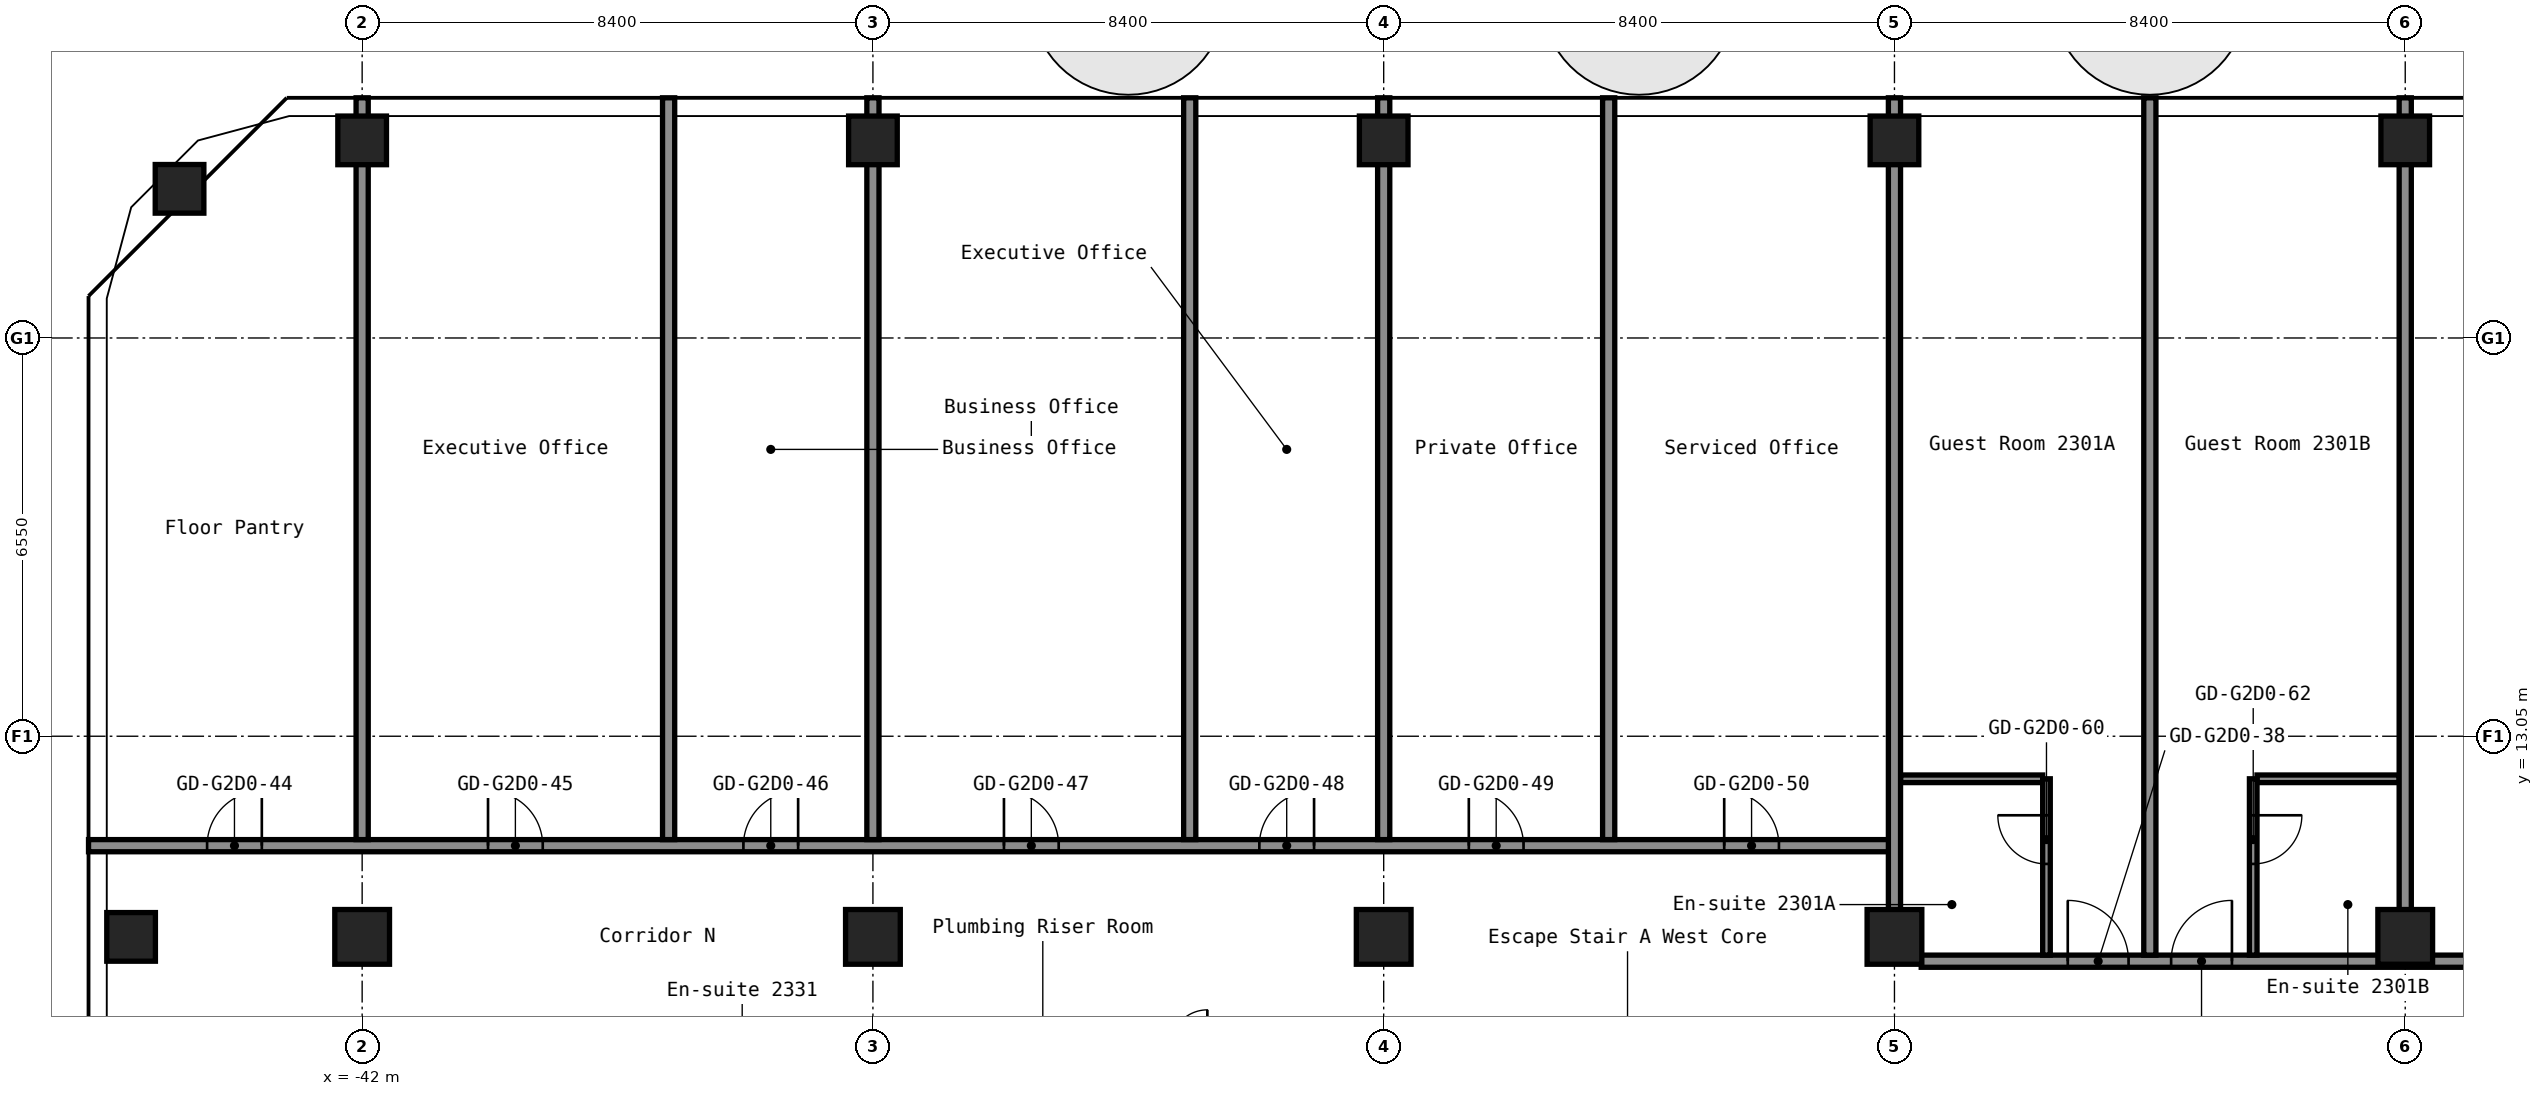
"""IFC4 building model, lengths in metres.
Left out: names, types, materials, properties, quantities, classifications, styles, units other than length and angle.
Written with IfcOpenShell. Run it as: python <this file> out.ifc"""

import sys

from ifc_helpers import new_model, si_unit, direction, frame, frame_2d, origin, origin_2d, place, context, subcontext, project, spatial, rectangle, hollow_rectangle, extrude, element, fill, save


model = new_model("IFC4")
c1 = context("Model", 3, precision=1e-05, world=origin(), true_north=direction((0.0, 1.0)))
c2 = subcontext(c1, "Body", "Model", "MODEL_VIEW")
j1 = project(units=[si_unit("LENGTHUNIT", "METRE"), si_unit("PLANEANGLEUNIT", "RADIAN")], contexts=[c1])
p1 = place(None, origin())
s1 = spatial("IfcSite", under=j1, at=p1, CompositionType="ELEMENT")
p2 = place(p1, origin())
s2 = spatial("IfcBuilding", under=s1, at=p2, CompositionType="ELEMENT")
p3 = place(p2, frame((0.0, 0.0, 85.0)))
s3 = spatial("IfcBuildingStorey", under=s2, at=p3, CompositionType="ELEMENT", Elevation=85.0)
for number, where, z_axis, x_axis in (
    (1, (-45.8, 9.75, 0.0), (0.0, 0.0, 1.0), (1.0, 0.0, 0.0)),
    (2, (-45.003, 22.053, 0.0), (0.0, 0.0, 1.0), (1.0, 0.0, 0.0)),
):
    element("IfcColumn", number, at=place(p3, frame(where, z_axis=z_axis, x_axis=x_axis)), inside=s3, PredefinedType="COLUMN", context=c2, shape_type="SweptSolid", body=[
        extrude(hollow_rectangle(XDim=0.8, YDim=0.8, WallThickness=0.032, at=origin_2d()), origin(), (0.0, 0.0, 1.0), 2.8),
    ])
p4 = place(p3, frame((-42.0, 9.75, 0.0), z_axis=(0.0, 0.0, 1.0), x_axis=(1.0, 0.0, 0.0)))
e3 = element("IfcColumn", 3, at=p4, inside=s3, PredefinedType="COLUMN", context=c2, shape_type="SweptSolid", body=[
    extrude(hollow_rectangle(XDim=0.9, YDim=0.9, WallThickness=0.036, at=origin_2d()), origin(), (0.0, 0.0, 1.0), 2.8),
])
p5 = place(p3, frame((-42.0, 22.85, 0.0), z_axis=(0.0, 0.0, 1.0), x_axis=(1.0, 0.0, 0.0)))
e4 = element("IfcColumn", 4, at=p5, inside=s3, PredefinedType="COLUMN", context=c2, shape_type="SweptSolid", body=[
    extrude(hollow_rectangle(XDim=0.8, YDim=0.8, WallThickness=0.032, at=origin_2d()), origin(), (0.0, 0.0, 1.0), 2.8),
])
p6 = place(p3, frame((-33.6, 9.75, 0.0), z_axis=(0.0, 0.0, 1.0), x_axis=(1.0, 0.0, 0.0)))
e5 = element("IfcColumn", 5, at=p6, inside=s3, PredefinedType="COLUMN", context=c2, shape_type="SweptSolid", body=[
    extrude(hollow_rectangle(XDim=0.9, YDim=0.9, WallThickness=0.036, at=origin_2d()), origin(), (0.0, 0.0, 1.0), 2.8),
])
p7 = place(p3, frame((-33.6, 22.85, 0.0), z_axis=(0.0, 0.0, 1.0), x_axis=(1.0, 0.0, 0.0)))
e6 = element("IfcColumn", 6, at=p7, inside=s3, PredefinedType="COLUMN", context=c2, shape_type="SweptSolid", body=[
    extrude(hollow_rectangle(XDim=0.8, YDim=0.8, WallThickness=0.032, at=origin_2d()), origin(), (0.0, 0.0, 1.0), 2.8),
])
p8 = place(p3, frame((-25.2, 9.75, 0.0), z_axis=(0.0, 0.0, 1.0), x_axis=(1.0, 0.0, 0.0)))
e7 = element("IfcColumn", 7, at=p8, inside=s3, PredefinedType="COLUMN", context=c2, shape_type="SweptSolid", body=[
    extrude(hollow_rectangle(XDim=0.9, YDim=0.9, WallThickness=0.036, at=origin_2d()), origin(), (0.0, 0.0, 1.0), 2.8),
])
p9 = place(p3, frame((-25.2, 22.85, 0.0), z_axis=(0.0, 0.0, 1.0), x_axis=(1.0, 0.0, 0.0)))
e8 = element("IfcColumn", 8, at=p9, inside=s3, PredefinedType="COLUMN", context=c2, shape_type="SweptSolid", body=[
    extrude(hollow_rectangle(XDim=0.8, YDim=0.8, WallThickness=0.032, at=origin_2d()), origin(), (0.0, 0.0, 1.0), 2.8),
])
p10 = place(p3, frame((-16.8, 9.75, 0.0), z_axis=(0.0, 0.0, 1.0), x_axis=(1.0, 0.0, 0.0)))
e9 = element("IfcColumn", 9, at=p10, inside=s3, PredefinedType="COLUMN", context=c2, shape_type="SweptSolid", body=[
    extrude(hollow_rectangle(XDim=0.9, YDim=0.9, WallThickness=0.036, at=origin_2d()), origin(), (0.0, 0.0, 1.0), 2.8),
])
p11 = place(p3, frame((-16.8, 22.85, 0.0), z_axis=(0.0, 0.0, 1.0), x_axis=(1.0, 0.0, 0.0)))
e10 = element("IfcColumn", 10, at=p11, inside=s3, PredefinedType="COLUMN", context=c2, shape_type="SweptSolid", body=[
    extrude(hollow_rectangle(XDim=0.8, YDim=0.8, WallThickness=0.032, at=origin_2d()), origin(), (0.0, 0.0, 1.0), 2.8),
])
p12 = place(p3, frame((-8.4, 9.75, 0.0), z_axis=(0.0, 0.0, 1.0), x_axis=(1.0, 0.0, 0.0)))
e11 = element("IfcColumn", 11, at=p12, inside=s3, PredefinedType="COLUMN", context=c2, shape_type="SweptSolid", body=[
    extrude(hollow_rectangle(XDim=0.9, YDim=0.9, WallThickness=0.036, at=origin_2d()), origin(), (0.0, 0.0, 1.0), 2.8),
])
p13 = place(p3, frame((-8.4, 22.85, 0.0), z_axis=(0.0, 0.0, 1.0), x_axis=(1.0, 0.0, 0.0)))
e12 = element("IfcColumn", 12, at=p13, inside=s3, PredefinedType="COLUMN", context=c2, shape_type="SweptSolid", body=[
    extrude(hollow_rectangle(XDim=0.8, YDim=0.8, WallThickness=0.032, at=origin_2d()), origin(), (0.0, 0.0, 1.0), 2.8),
])
p14 = place(p3, frame((-16.36, 9.35, 0.0), z_axis=(0.0, 0.0, 1.0), x_axis=(1.0, 0.0, 0.0)))
e13 = element("IfcWall", 13, at=p14, inside=s3, PredefinedType="PARTITIONING", context=c2, shape_type="SweptSolid", body=[
    extrude(rectangle(XDim=32.72, YDim=0.2, at=frame_2d((16.36, 0.0))), origin(), (0.0, 0.0, 1.0), 2.8),
])
p15 = place(p14, frame((2.41, 0.0, 0.0)))
e14 = element("IfcOpeningElement", 14, at=p15, cuts=e13, PredefinedType="OPENING", context=c2, shape_type="SweptSolid", body=[
    extrude(rectangle(XDim=1.0, YDim=2.1, at=frame_2d((0.5, 1.05))), frame((0.0, 0.11, 0.0), z_axis=(0.0, -1.0, 0.0), x_axis=(1.0, 0.0, 0.0)), (0.0, 0.0, 1.0), 0.22),
])
p16 = place(p14, frame((4.11, 0.0, 0.0)))
e15 = element("IfcOpeningElement", 15, at=p16, cuts=e13, PredefinedType="OPENING", context=c2, shape_type="SweptSolid", body=[
    extrude(rectangle(XDim=1.0, YDim=2.1, at=frame_2d((0.5, 1.05))), frame((0.0, 0.11, 0.0), z_axis=(0.0, -1.0, 0.0), x_axis=(1.0, 0.0, 0.0)), (0.0, 0.0, 1.0), 0.22),
])
p17 = place(p14, frame((9.96, 0.0, 0.0)))
e16 = element("IfcOpeningElement", 16, at=p17, cuts=e13, PredefinedType="OPENING", context=c2, shape_type="SweptSolid", body=[
    extrude(rectangle(XDim=1.0, YDim=2.1, at=frame_2d((0.5, 1.05))), frame((0.0, 0.11, 0.0), z_axis=(0.0, -1.0, 0.0), x_axis=(1.0, 0.0, 0.0)), (0.0, 0.0, 1.0), 0.22),
])
p18 = place(p14, frame((19.21, 0.0, 0.0)))
e17 = element("IfcOpeningElement", 17, at=p18, cuts=e13, PredefinedType="OPENING", context=c2, shape_type="SweptSolid", body=[
    extrude(rectangle(XDim=1.0, YDim=2.1, at=frame_2d((0.5, 1.05))), frame((0.0, 0.11, 0.0), z_axis=(0.0, -1.0, 0.0), x_axis=(1.0, 0.0, 0.0)), (0.0, 0.0, 1.0), 0.22),
])
p19 = place(p14, frame((20.91, 0.0, 0.0)))
e18 = element("IfcOpeningElement", 18, at=p19, cuts=e13, PredefinedType="OPENING", context=c2, shape_type="SweptSolid", body=[
    extrude(rectangle(XDim=1.0, YDim=2.1, at=frame_2d((0.5, 1.05))), frame((0.0, 0.11, 0.0), z_axis=(0.0, -1.0, 0.0), x_axis=(1.0, 0.0, 0.0)), (0.0, 0.0, 1.0), 0.22),
])
p20 = place(p14, frame((30.16, 0.0, 0.0)))
e19 = element("IfcOpeningElement", 19, at=p20, cuts=e13, PredefinedType="OPENING", context=c2, shape_type="SweptSolid", body=[
    extrude(rectangle(XDim=1.0, YDim=2.1, at=frame_2d((0.5, 1.05))), frame((0.0, 0.11, 0.0), z_axis=(0.0, -1.0, 0.0), x_axis=(1.0, 0.0, 0.0)), (0.0, 0.0, 1.0), 0.22),
])
p21 = place(p3, frame((-46.5, 11.25, 0.0), z_axis=(0.0, 0.0, 1.0), x_axis=(1.0, 0.0, 0.0)))
e20 = element("IfcWall", 20, at=p21, inside=s3, PredefinedType="PARTITIONING", context=c2, shape_type="SweptSolid", body=[
    extrude(rectangle(XDim=29.7, YDim=0.2, at=frame_2d((14.85, 0.0))), origin(), (0.0, 0.0, 1.0), 2.8),
])
p22 = place(p21, frame((1.95, 0.0, 0.0)))
e21 = element("IfcOpeningElement", 21, at=p22, cuts=e20, PredefinedType="OPENING", context=c2, shape_type="SweptSolid", body=[
    extrude(rectangle(XDim=0.9, YDim=2.1, at=frame_2d((0.45, 1.05))), frame((0.0, 0.11, 0.0), z_axis=(0.0, -1.0, 0.0), x_axis=(1.0, 0.0, 0.0)), (0.0, 0.0, 1.0), 0.22),
])
p23 = place(p21, frame((6.57, 0.0, 0.0)))
e22 = element("IfcOpeningElement", 22, at=p23, cuts=e20, PredefinedType="OPENING", context=c2, shape_type="SweptSolid", body=[
    extrude(rectangle(XDim=0.9, YDim=2.1, at=frame_2d((0.45, 1.05))), frame((0.0, 0.11, 0.0), z_axis=(0.0, -1.0, 0.0), x_axis=(1.0, 0.0, 0.0)), (0.0, 0.0, 1.0), 0.22),
])
p24 = place(p21, frame((10.77, 0.0, 0.0)))
e23 = element("IfcOpeningElement", 23, at=p24, cuts=e20, PredefinedType="OPENING", context=c2, shape_type="SweptSolid", body=[
    extrude(rectangle(XDim=0.9, YDim=2.1, at=frame_2d((0.45, 1.05))), frame((0.0, 0.11, 0.0), z_axis=(0.0, -1.0, 0.0), x_axis=(1.0, 0.0, 0.0)), (0.0, 0.0, 1.0), 0.22),
])
p25 = place(p21, frame((15.055, 0.0, 0.0)))
e24 = element("IfcOpeningElement", 24, at=p25, cuts=e20, PredefinedType="OPENING", context=c2, shape_type="SweptSolid", body=[
    extrude(rectangle(XDim=0.9, YDim=2.1, at=frame_2d((0.45, 1.05))), frame((0.0, 0.11, 0.0), z_axis=(0.0, -1.0, 0.0), x_axis=(1.0, 0.0, 0.0)), (0.0, 0.0, 1.0), 0.22),
])
p26 = place(p21, frame((19.255, 0.0, 0.0)))
e25 = element("IfcOpeningElement", 25, at=p26, cuts=e20, PredefinedType="OPENING", context=c2, shape_type="SweptSolid", body=[
    extrude(rectangle(XDim=0.9, YDim=2.1, at=frame_2d((0.45, 1.05))), frame((0.0, 0.11, 0.0), z_axis=(0.0, -1.0, 0.0), x_axis=(1.0, 0.0, 0.0)), (0.0, 0.0, 1.0), 0.22),
])
p27 = place(p21, frame((22.7, 0.0, 0.0)))
e26 = element("IfcOpeningElement", 26, at=p27, cuts=e20, PredefinedType="OPENING", context=c2, shape_type="SweptSolid", body=[
    extrude(rectangle(XDim=0.9, YDim=2.1, at=frame_2d((0.45, 1.05))), frame((0.0, 0.11, 0.0), z_axis=(0.0, -1.0, 0.0), x_axis=(1.0, 0.0, 0.0)), (0.0, 0.0, 1.0), 0.22),
])
p28 = place(p21, frame((26.9, 0.0, 0.0)))
e27 = element("IfcOpeningElement", 27, at=p28, cuts=e20, PredefinedType="OPENING", context=c2, shape_type="SweptSolid", body=[
    extrude(rectangle(XDim=0.9, YDim=2.1, at=frame_2d((0.45, 1.05))), frame((0.0, 0.11, 0.0), z_axis=(0.0, -1.0, 0.0), x_axis=(1.0, 0.0, 0.0)), (0.0, 0.0, 1.0), 0.22),
])
for number, where, z_axis, x_axis in (
    (28, (-16.7, 12.35, 0.0), (0.0, 0.0, 1.0), (1.0, 0.0, 0.0)),
    (29, (-10.837, 12.35, 0.0), (0.0, 0.0, 1.0), (1.0, 0.0, 0.0)),
):
    element("IfcWall", number, at=place(p3, frame(where, z_axis=z_axis, x_axis=x_axis)), inside=s3, PredefinedType="PARTITIONING", context=c2, shape_type="SweptSolid", body=[
        extrude(rectangle(XDim=2.337, YDim=0.125, at=frame_2d((1.169, 0.0))), origin(), (0.0, 0.0, 1.0), 2.8),
    ])
for number, where, z_axis, x_axis in (
    (30, (-42.0, 11.35, 0.0), (0.0, 0.0, 1.0), (0.0, 1.0, 0.0)),
    (31, (-36.96, 11.35, 0.0), (0.0, 0.0, 1.0), (0.0, 1.0, 0.0)),
    (32, (-33.6, 11.35, 0.0), (0.0, 0.0, 1.0), (0.0, 1.0, 0.0)),
    (33, (-28.39, 11.35, 0.0), (0.0, 0.0, 1.0), (0.0, 1.0, 0.0)),
    (34, (-25.2, 11.35, 0.0), (0.0, 0.0, 1.0), (0.0, 1.0, 0.0)),
    (35, (-21.5, 11.35, 0.0), (0.0, 0.0, 1.0), (0.0, 1.0, 0.0)),
):
    element("IfcWall", number, at=place(p3, frame(where, z_axis=z_axis, x_axis=x_axis)), inside=s3, PredefinedType="PARTITIONING", context=c2, shape_type="SweptSolid", body=[
        extrude(rectangle(XDim=12.2, YDim=0.2, at=frame_2d((6.1, 0.0))), origin(), (0.0, 0.0, 1.0), 2.8),
    ])
p29 = place(p3, frame((-16.8, 10.19, 0.0), z_axis=(0.0, 0.0, 1.0), x_axis=(0.0, 1.0, 0.0)))
e36 = element("IfcWall", 36, at=p29, inside=s3, PredefinedType="PARTITIONING", context=c2, shape_type="SweptSolid", body=[
    extrude(rectangle(XDim=13.36, YDim=0.2, at=frame_2d((6.68, 0.0))), origin(), (0.0, 0.0, 1.0), 2.8),
])
p30 = place(p3, frame((-14.3, 9.45, 0.0), z_axis=(0.0, 0.0, 1.0), x_axis=(0.0, 1.0, 0.0)))
e37 = element("IfcWall", 37, at=p30, inside=s3, PredefinedType="PARTITIONING", context=c2, shape_type="SweptSolid", body=[
    extrude(rectangle(XDim=2.9, YDim=0.125, at=frame_2d((1.45, 0.0))), origin(), (0.0, 0.0, 1.0), 2.8),
])
p31 = place(p30, frame((1.5, 0.0, 0.0)))
e38 = element("IfcOpeningElement", 38, at=p31, cuts=e37, PredefinedType="OPENING", context=c2, shape_type="SweptSolid", body=[
    extrude(rectangle(XDim=0.8, YDim=2.1, at=frame_2d((0.4, 1.05))), frame((0.0, 0.073, 0.0), z_axis=(0.0, -1.0, 0.0), x_axis=(1.0, 0.0, 0.0)), (0.0, 0.0, 1.0), 0.145),
])
p32 = place(p3, frame((-12.6, 9.45, 0.0), z_axis=(0.0, 0.0, 1.0), x_axis=(0.0, 1.0, 0.0)))
e39 = element("IfcWall", 39, at=p32, inside=s3, PredefinedType="PARTITIONING", context=c2, shape_type="SweptSolid", body=[
    extrude(rectangle(XDim=14.1, YDim=0.2, at=frame_2d((7.05, 0.0))), origin(), (0.0, 0.0, 1.0), 2.8),
])
p33 = place(p3, frame((-10.9, 9.45, 0.0), z_axis=(0.0, 0.0, 1.0), x_axis=(0.0, 1.0, 0.0)))
e40 = element("IfcWall", 40, at=p33, inside=s3, PredefinedType="PARTITIONING", context=c2, shape_type="SweptSolid", body=[
    extrude(rectangle(XDim=2.9, YDim=0.125, at=frame_2d((1.45, 0.0))), origin(), (0.0, 0.0, 1.0), 2.8),
])
p34 = place(p33, frame((1.5, 0.0, 0.0)))
e41 = element("IfcOpeningElement", 41, at=p34, cuts=e40, PredefinedType="OPENING", context=c2, shape_type="SweptSolid", body=[
    extrude(rectangle(XDim=0.8, YDim=2.1, at=frame_2d((0.4, 1.05))), frame((0.0, 0.073, 0.0), z_axis=(0.0, -1.0, 0.0), x_axis=(1.0, 0.0, 0.0)), (0.0, 0.0, 1.0), 0.145),
])
p35 = place(p3, frame((-8.4, 10.19, 0.0), z_axis=(0.0, 0.0, 1.0), x_axis=(0.0, 1.0, 0.0)))
e42 = element("IfcWall", 42, at=p35, inside=s3, PredefinedType="PARTITIONING", context=c2, shape_type="SweptSolid", body=[
    extrude(rectangle(XDim=13.36, YDim=0.2, at=frame_2d((6.68, 0.0))), origin(), (0.0, 0.0, 1.0), 2.8),
])
p36 = place(p15, origin())
e43 = element("IfcDoor", 43, at=p36, inside=s3, OperationType="SINGLE_SWING_RIGHT", PredefinedType="DOOR", context=c2, shape_type="SweptSolid", body=[
    extrude(rectangle(XDim=1.0, YDim=2.1, at=frame_2d((0.5, 1.05))), frame((0.0, 0.025, 0.0), z_axis=(0.0, -1.0, 0.0), x_axis=(1.0, 0.0, 0.0)), (0.0, 0.0, 1.0), 0.05),
])
fill(e14, e43)
p37 = place(p16, origin())
e44 = element("IfcDoor", 44, at=p37, inside=s3, OperationType="SINGLE_SWING_LEFT", PredefinedType="DOOR", context=c2, shape_type="SweptSolid", body=[
    extrude(rectangle(XDim=1.0, YDim=2.1, at=frame_2d((0.5, 1.05))), frame((0.0, 0.025, 0.0), z_axis=(0.0, -1.0, 0.0), x_axis=(1.0, 0.0, 0.0)), (0.0, 0.0, 1.0), 0.05),
])
fill(e15, e44)
p38 = place(p22, origin())
e45 = element("IfcDoor", 45, at=p38, inside=s3, OperationType="SINGLE_SWING_LEFT", PredefinedType="DOOR", context=c2, shape_type="SweptSolid", body=[
    extrude(rectangle(XDim=0.9, YDim=2.1, at=frame_2d((0.45, 1.05))), frame((0.0, 0.025, 0.0), z_axis=(0.0, -1.0, 0.0), x_axis=(1.0, 0.0, 0.0)), (0.0, 0.0, 1.0), 0.05),
])
fill(e21, e45)
p39 = place(p23, origin())
e46 = element("IfcDoor", 46, at=p39, inside=s3, OperationType="SINGLE_SWING_RIGHT", PredefinedType="DOOR", context=c2, shape_type="SweptSolid", body=[
    extrude(rectangle(XDim=0.9, YDim=2.1, at=frame_2d((0.45, 1.05))), frame((0.0, 0.025, 0.0), z_axis=(0.0, -1.0, 0.0), x_axis=(1.0, 0.0, 0.0)), (0.0, 0.0, 1.0), 0.05),
])
fill(e22, e46)
p40 = place(p24, origin())
e47 = element("IfcDoor", 47, at=p40, inside=s3, OperationType="SINGLE_SWING_LEFT", PredefinedType="DOOR", context=c2, shape_type="SweptSolid", body=[
    extrude(rectangle(XDim=0.9, YDim=2.1, at=frame_2d((0.45, 1.05))), frame((0.0, 0.025, 0.0), z_axis=(0.0, -1.0, 0.0), x_axis=(1.0, 0.0, 0.0)), (0.0, 0.0, 1.0), 0.05),
])
fill(e23, e47)
p41 = place(p25, origin())
e48 = element("IfcDoor", 48, at=p41, inside=s3, OperationType="SINGLE_SWING_RIGHT", PredefinedType="DOOR", context=c2, shape_type="SweptSolid", body=[
    extrude(rectangle(XDim=0.9, YDim=2.1, at=frame_2d((0.45, 1.05))), frame((0.0, 0.025, 0.0), z_axis=(0.0, -1.0, 0.0), x_axis=(1.0, 0.0, 0.0)), (0.0, 0.0, 1.0), 0.05),
])
fill(e24, e48)
p42 = place(p26, origin())
e49 = element("IfcDoor", 49, at=p42, inside=s3, OperationType="SINGLE_SWING_LEFT", PredefinedType="DOOR", context=c2, shape_type="SweptSolid", body=[
    extrude(rectangle(XDim=0.9, YDim=2.1, at=frame_2d((0.45, 1.05))), frame((0.0, 0.025, 0.0), z_axis=(0.0, -1.0, 0.0), x_axis=(1.0, 0.0, 0.0)), (0.0, 0.0, 1.0), 0.05),
])
fill(e25, e49)
p43 = place(p27, origin())
e50 = element("IfcDoor", 50, at=p43, inside=s3, OperationType="SINGLE_SWING_RIGHT", PredefinedType="DOOR", context=c2, shape_type="SweptSolid", body=[
    extrude(rectangle(XDim=0.9, YDim=2.1, at=frame_2d((0.45, 1.05))), frame((0.0, 0.025, 0.0), z_axis=(0.0, -1.0, 0.0), x_axis=(1.0, 0.0, 0.0)), (0.0, 0.0, 1.0), 0.05),
])
fill(e26, e50)
p44 = place(p28, origin())
e51 = element("IfcDoor", 51, at=p44, inside=s3, OperationType="SINGLE_SWING_RIGHT", PredefinedType="DOOR", context=c2, shape_type="SweptSolid", body=[
    extrude(rectangle(XDim=0.9, YDim=2.1, at=frame_2d((0.45, 1.05))), frame((0.0, 0.025, 0.0), z_axis=(0.0, -1.0, 0.0), x_axis=(1.0, 0.0, 0.0)), (0.0, 0.0, 1.0), 0.05),
])
fill(e27, e51)
p45 = place(p31, origin())
e52 = element("IfcDoor", 52, at=p45, inside=s3, OperationType="SINGLE_SWING_LEFT", PredefinedType="DOOR", context=c2, shape_type="SweptSolid", body=[
    extrude(rectangle(XDim=0.8, YDim=2.1, at=frame_2d((0.4, 1.05))), frame((0.0, 0.025, 0.0), z_axis=(0.0, -1.0, 0.0), x_axis=(1.0, 0.0, 0.0)), (0.0, 0.0, 1.0), 0.05),
])
fill(e38, e52)
p46 = place(p34, origin())
e53 = element("IfcDoor", 53, at=p46, inside=s3, OperationType="SINGLE_SWING_RIGHT", PredefinedType="DOOR", context=c2, shape_type="SweptSolid", body=[
    extrude(rectangle(XDim=0.8, YDim=2.1, at=frame_2d((0.4, 1.05))), frame((0.0, 0.025, 0.0), z_axis=(0.0, -1.0, 0.0), x_axis=(1.0, 0.0, 0.0)), (0.0, 0.0, 1.0), 0.05),
])
fill(e41, e53)
save(model, sys.argv[1])
